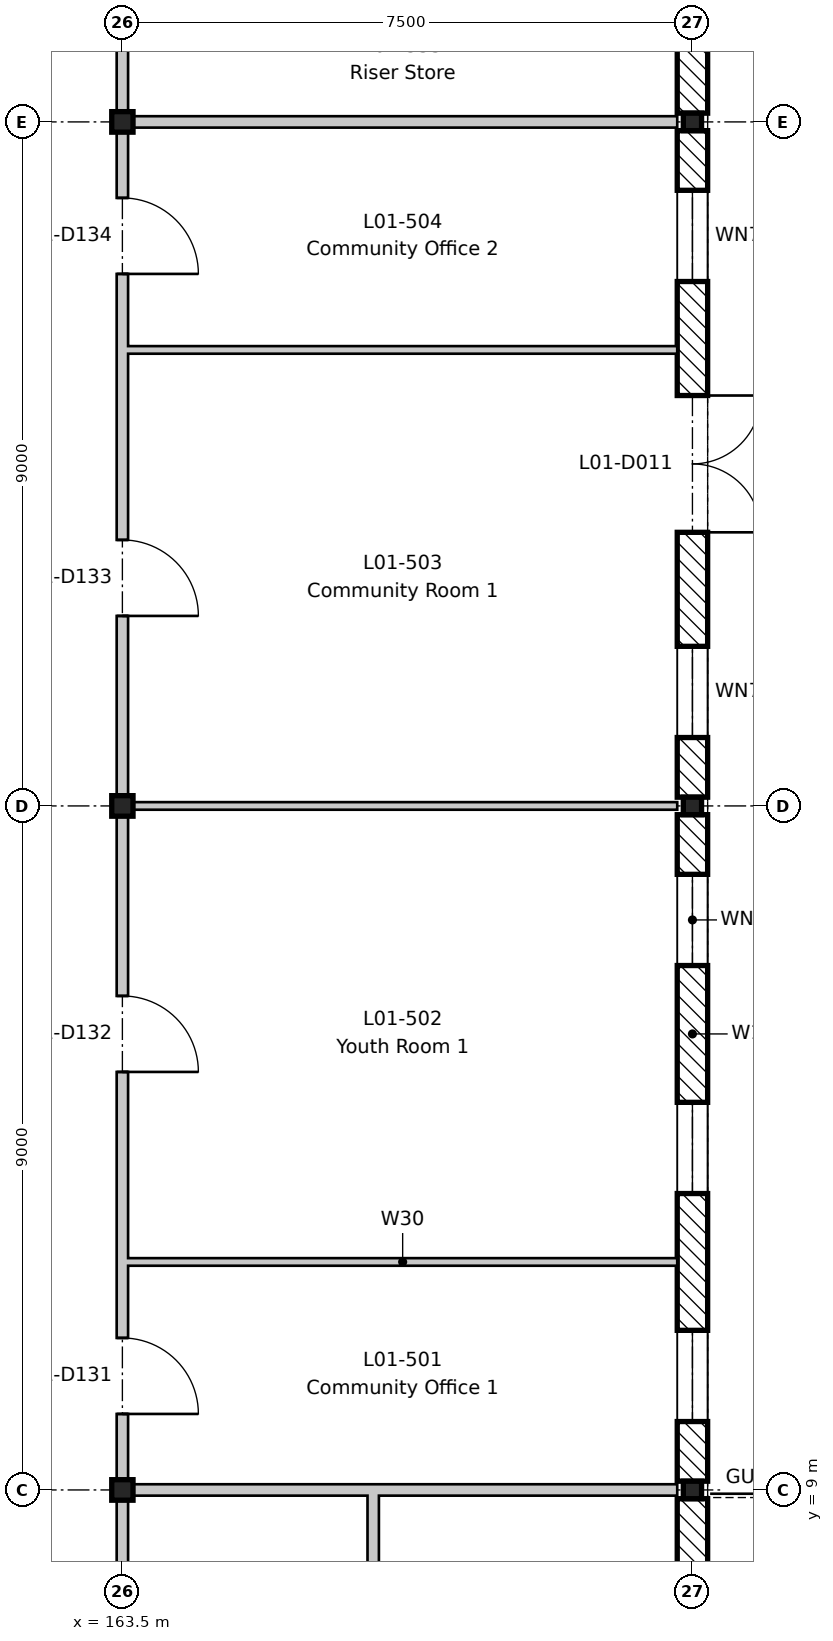
"""IFC4 building model, lengths in metres.
Left out: names, types, materials, properties, quantities, classifications, styles, units other than length and angle.
Written with IfcOpenShell. Run it as: python <this file> out.ifc"""

import sys

from ifc_helpers import new_model, si_unit, direction, frame, frame_2d, origin, origin_2d, place, context, subcontext, project, spatial, rectangle, i_section, extrude, element, fill, save


model = new_model("IFC4")
c1 = context("Model", 3, precision=1e-05, world=origin(), true_north=direction((0.0, 1.0)))
c2 = subcontext(c1, "Body", "Model", "MODEL_VIEW")
j1 = project(units=[si_unit("LENGTHUNIT", "METRE"), si_unit("PLANEANGLEUNIT", "RADIAN")], contexts=[c1])
p1 = place(None, origin())
s1 = spatial("IfcSite", under=j1, at=p1, CompositionType="ELEMENT")
p2 = place(p1, origin())
s2 = spatial("IfcBuilding", under=s1, at=p2, CompositionType="ELEMENT")
p3 = place(p2, frame((0.0, 0.0, 5.4)))
s3 = spatial("IfcBuildingStorey", under=s2, at=p3, CompositionType="ELEMENT", Elevation=5.4)
for number, where, z_axis, x_axis in (
    (1, (163.5, 9.0, -0.2), (0.0, 0.0, 1.0), (1.0, 0.0, 0.0)),
    (2, (163.5, 18.0, -0.2), (0.0, 0.0, 1.0), (1.0, 0.0, 0.0)),
    (3, (163.5, 27.0, -0.2), (0.0, 0.0, 1.0), (1.0, 0.0, 0.0)),
):
    element("IfcColumn", number, at=place(p3, frame(where, z_axis=z_axis, x_axis=x_axis)), inside=s3, PredefinedType="COLUMN", context=c2, shape_type="SweptSolid", body=[
        extrude(i_section(OverallWidth=0.28, OverallDepth=0.27, WebThickness=0.008, FlangeThickness=0.013, FilletRadius=0.024, at=origin_2d()), origin(), (0.0, 0.0, 1.0), 4.5),
    ])
for number, where, z_axis, x_axis in (
    (4, (171.0, 9.0, -0.2), (0.0, 0.0, 1.0), (1.0, 0.0, 0.0)),
    (5, (171.0, 18.0, -0.2), (0.0, 0.0, 1.0), (1.0, 0.0, 0.0)),
    (6, (171.0, 27.0, -0.2), (0.0, 0.0, 1.0), (1.0, 0.0, 0.0)),
):
    element("IfcColumn", number, at=place(p3, frame(where, z_axis=z_axis, x_axis=x_axis)), inside=s3, PredefinedType="COLUMN", context=c2, shape_type="SweptSolid", body=[
        extrude(i_section(OverallWidth=0.24, OverallDepth=0.23, WebThickness=0.008, FlangeThickness=0.012, FilletRadius=0.021, at=origin_2d()), origin(), (0.0, 0.0, 1.0), 4.5),
    ])
p4 = place(p3, frame((171.0, 8.885, 0.0), z_axis=(0.0, 0.0, 1.0), x_axis=(0.0, -1.0, 0.0)))
e7 = element("IfcWall", 7, at=p4, inside=s3, PredefinedType="STANDARD", context=c2, shape_type="SweptSolid", body=[
    extrude(rectangle(XDim=8.77, YDim=0.4, at=frame_2d((4.385, 0.0))), origin(), (0.0, 0.0, 1.0), 3.9),
])
p5 = place(p4, frame((7.085, 0.0, 1.5)))
e8 = element("IfcOpeningElement", 8, at=p5, cuts=e7, PredefinedType="OPENING", context=c2, shape_type="SweptSolid", body=[
    extrude(rectangle(XDim=0.6, YDim=1.2, at=frame_2d((0.3, 0.6))), frame((0.0, 0.21, 0.0), z_axis=(0.0, -1.0, 0.0), x_axis=(1.0, 0.0, 0.0)), (0.0, 0.0, 1.0), 0.42),
])
p6 = place(p4, frame((4.085, 0.0, 1.5)))
e9 = element("IfcOpeningElement", 9, at=p6, cuts=e7, PredefinedType="OPENING", context=c2, shape_type="SweptSolid", body=[
    extrude(rectangle(XDim=0.6, YDim=1.2, at=frame_2d((0.3, 0.6))), frame((0.0, 0.21, 0.0), z_axis=(0.0, -1.0, 0.0), x_axis=(1.0, 0.0, 0.0)), (0.0, 0.0, 1.0), 0.42),
])
p7 = place(p4, frame((1.085, 0.0, 1.5)))
e10 = element("IfcOpeningElement", 10, at=p7, cuts=e7, PredefinedType="OPENING", context=c2, shape_type="SweptSolid", body=[
    extrude(rectangle(XDim=0.6, YDim=1.2, at=frame_2d((0.3, 0.6))), frame((0.0, 0.21, 0.0), z_axis=(0.0, -1.0, 0.0), x_axis=(1.0, 0.0, 0.0)), (0.0, 0.0, 1.0), 0.42),
])
p8 = place(p3, frame((171.0, 17.885, 0.0), z_axis=(0.0, 0.0, 1.0), x_axis=(0.0, -1.0, 0.0)))
e11 = element("IfcWall", 11, at=p8, inside=s3, PredefinedType="STANDARD", context=c2, shape_type="SweptSolid", body=[
    extrude(rectangle(XDim=8.77, YDim=0.4, at=frame_2d((4.385, 0.0))), origin(), (0.0, 0.0, 1.0), 3.9),
])
p9 = place(p8, frame((6.785, 0.0, 0.9)))
e12 = element("IfcOpeningElement", 12, at=p9, cuts=e11, PredefinedType="OPENING", context=c2, shape_type="SweptSolid", body=[
    extrude(rectangle(XDim=1.2, YDim=2.4, at=frame_2d((0.6, 1.2))), frame((0.0, 0.21, 0.0), z_axis=(0.0, -1.0, 0.0), x_axis=(1.0, 0.0, 0.0)), (0.0, 0.0, 1.0), 0.42),
])
p10 = place(p8, frame((3.785, 0.0, 0.9)))
e13 = element("IfcOpeningElement", 13, at=p10, cuts=e11, PredefinedType="OPENING", context=c2, shape_type="SweptSolid", body=[
    extrude(rectangle(XDim=1.2, YDim=2.4, at=frame_2d((0.6, 1.2))), frame((0.0, 0.21, 0.0), z_axis=(0.0, -1.0, 0.0), x_axis=(1.0, 0.0, 0.0)), (0.0, 0.0, 1.0), 0.42),
])
p11 = place(p8, frame((0.785, 0.0, 0.9)))
e14 = element("IfcOpeningElement", 14, at=p11, cuts=e11, PredefinedType="OPENING", context=c2, shape_type="SweptSolid", body=[
    extrude(rectangle(XDim=1.2, YDim=2.4, at=frame_2d((0.6, 1.2))), frame((0.0, 0.21, 0.0), z_axis=(0.0, -1.0, 0.0), x_axis=(1.0, 0.0, 0.0)), (0.0, 0.0, 1.0), 0.42),
])
p12 = place(p3, frame((171.0, 26.885, 0.0), z_axis=(0.0, 0.0, 1.0), x_axis=(0.0, -1.0, 0.0)))
e15 = element("IfcWall", 15, at=p12, inside=s3, PredefinedType="STANDARD", context=c2, shape_type="SweptSolid", body=[
    extrude(rectangle(XDim=8.77, YDim=0.4, at=frame_2d((4.385, 0.0))), origin(), (0.0, 0.0, 1.0), 3.9),
])
p13 = place(p12, frame((3.485, 0.0, 0.0)))
e16 = element("IfcOpeningElement", 16, at=p13, cuts=e15, PredefinedType="OPENING", context=c2, shape_type="SweptSolid", body=[
    extrude(rectangle(XDim=1.8, YDim=2.4, at=frame_2d((0.9, 1.2))), frame((0.0, 0.21, 0.0), z_axis=(0.0, -1.0, 0.0), x_axis=(1.0, 0.0, 0.0)), (0.0, 0.0, 1.0), 0.42),
])
p14 = place(p12, frame((6.785, 0.0, 0.9)))
e17 = element("IfcOpeningElement", 17, at=p14, cuts=e15, PredefinedType="OPENING", context=c2, shape_type="SweptSolid", body=[
    extrude(rectangle(XDim=1.2, YDim=2.4, at=frame_2d((0.6, 1.2))), frame((0.0, 0.21, 0.0), z_axis=(0.0, -1.0, 0.0), x_axis=(1.0, 0.0, 0.0)), (0.0, 0.0, 1.0), 0.42),
])
p15 = place(p12, frame((0.785, 0.0, 0.9)))
e18 = element("IfcOpeningElement", 18, at=p15, cuts=e15, PredefinedType="OPENING", context=c2, shape_type="SweptSolid", body=[
    extrude(rectangle(XDim=1.2, YDim=2.4, at=frame_2d((0.6, 1.2))), frame((0.0, 0.21, 0.0), z_axis=(0.0, -1.0, 0.0), x_axis=(1.0, 0.0, 0.0)), (0.0, 0.0, 1.0), 0.42),
])
p16 = place(p3, frame((171.0, 35.885, 0.0), z_axis=(0.0, 0.0, 1.0), x_axis=(0.0, -1.0, 0.0)))
e19 = element("IfcWall", 19, at=p16, inside=s3, PredefinedType="STANDARD", context=c2, shape_type="SweptSolid", body=[
    extrude(rectangle(XDim=8.77, YDim=0.4, at=frame_2d((4.385, 0.0))), origin(), (0.0, 0.0, 1.0), 3.9),
])
p17 = place(p16, frame((3.785, 0.0, 0.9)))
e20 = element("IfcOpeningElement", 20, at=p17, cuts=e19, PredefinedType="OPENING", context=c2, shape_type="SweptSolid", body=[
    extrude(rectangle(XDim=1.2, YDim=2.7, at=frame_2d((0.6, 1.35))), frame((0.0, 0.21, 0.0), z_axis=(0.0, -1.0, 0.0), x_axis=(1.0, 0.0, 0.0)), (0.0, 0.0, 1.0), 0.42),
])
p18 = place(p16, frame((0.785, 0.0, 0.9)))
e21 = element("IfcOpeningElement", 21, at=p18, cuts=e19, PredefinedType="OPENING", context=c2, shape_type="SweptSolid", body=[
    extrude(rectangle(XDim=1.2, YDim=2.4, at=frame_2d((0.6, 1.2))), frame((0.0, 0.21, 0.0), z_axis=(0.0, -1.0, 0.0), x_axis=(1.0, 0.0, 0.0)), (0.0, 0.0, 1.0), 0.42),
])
p19 = place(p3, frame((163.575, 9.0, 0.0), z_axis=(0.0, 0.0, 1.0), x_axis=(1.0, 0.0, 0.0)))
e22 = element("IfcWall", 22, at=p19, inside=s3, PredefinedType="PARTITIONING", context=c2, shape_type="SweptSolid", body=[
    extrude(rectangle(XDim=7.225, YDim=0.15, at=frame_2d((3.613, 0.0))), origin(), (0.0, 0.0, 1.0), 3.95),
])
p20 = place(p3, frame((163.575, 12.0, 0.0), z_axis=(0.0, 0.0, 1.0), x_axis=(1.0, 0.0, 0.0)))
e23 = element("IfcWall", 23, at=p20, inside=s3, PredefinedType="PARTITIONING", context=c2, shape_type="SweptSolid", body=[
    extrude(rectangle(XDim=7.225, YDim=0.1, at=frame_2d((3.613, 0.0))), origin(), (0.0, 0.0, 1.0), 4.3),
])
p21 = place(p3, frame((163.575, 18.0, 0.0), z_axis=(0.0, 0.0, 1.0), x_axis=(1.0, 0.0, 0.0)))
e24 = element("IfcWall", 24, at=p21, inside=s3, PredefinedType="PARTITIONING", context=c2, shape_type="SweptSolid", body=[
    extrude(rectangle(XDim=7.225, YDim=0.1, at=frame_2d((3.613, 0.0))), origin(), (0.0, 0.0, 1.0), 3.95),
])
p22 = place(p3, frame((163.575, 24.0, 0.0), z_axis=(0.0, 0.0, 1.0), x_axis=(1.0, 0.0, 0.0)))
e25 = element("IfcWall", 25, at=p22, inside=s3, PredefinedType="PARTITIONING", context=c2, shape_type="SweptSolid", body=[
    extrude(rectangle(XDim=7.225, YDim=0.1, at=frame_2d((3.613, 0.0))), origin(), (0.0, 0.0, 1.0), 4.3),
])
p23 = place(p3, frame((163.575, 27.0, 0.0), z_axis=(0.0, 0.0, 1.0), x_axis=(1.0, 0.0, 0.0)))
e26 = element("IfcWall", 26, at=p23, inside=s3, PredefinedType="PARTITIONING", context=c2, shape_type="SweptSolid", body=[
    extrude(rectangle(XDim=7.225, YDim=0.15, at=frame_2d((3.613, 0.0))), origin(), (0.0, 0.0, 1.0), 3.95),
])
p24 = place(p3, frame((163.5, -8.8, 0.0), z_axis=(0.0, 0.0, 1.0), x_axis=(0.0, 1.0, 0.0)))
e27 = element("IfcWall", 27, at=p24, inside=s3, PredefinedType="PARTITIONING", context=c2, shape_type="SweptSolid", body=[
    extrude(rectangle(XDim=62.6, YDim=0.15, at=frame_2d((31.3, 0.0))), origin(), (0.0, 0.0, 1.0), 3.78),
])
p25 = place(p24, frame((18.8, 0.0, 0.0)))
e28 = element("IfcOpeningElement", 28, at=p25, cuts=e27, PredefinedType="OPENING", context=c2, shape_type="SweptSolid", body=[
    extrude(rectangle(XDim=1.0, YDim=2.1, at=frame_2d((0.5, 1.05))), frame((0.0, 0.085, 0.0), z_axis=(0.0, -1.0, 0.0), x_axis=(1.0, 0.0, 0.0)), (0.0, 0.0, 1.0), 0.17),
])
p26 = place(p24, frame((23.3, 0.0, 0.0)))
e29 = element("IfcOpeningElement", 29, at=p26, cuts=e27, PredefinedType="OPENING", context=c2, shape_type="SweptSolid", body=[
    extrude(rectangle(XDim=1.0, YDim=2.1, at=frame_2d((0.5, 1.05))), frame((0.0, 0.085, 0.0), z_axis=(0.0, -1.0, 0.0), x_axis=(1.0, 0.0, 0.0)), (0.0, 0.0, 1.0), 0.17),
])
p27 = place(p24, frame((29.3, 0.0, 0.0)))
e30 = element("IfcOpeningElement", 30, at=p27, cuts=e27, PredefinedType="OPENING", context=c2, shape_type="SweptSolid", body=[
    extrude(rectangle(XDim=1.0, YDim=2.1, at=frame_2d((0.5, 1.05))), frame((0.0, 0.085, 0.0), z_axis=(0.0, -1.0, 0.0), x_axis=(1.0, 0.0, 0.0)), (0.0, 0.0, 1.0), 0.17),
])
p28 = place(p24, frame((33.8, 0.0, 0.0)))
e31 = element("IfcOpeningElement", 31, at=p28, cuts=e27, PredefinedType="OPENING", context=c2, shape_type="SweptSolid", body=[
    extrude(rectangle(XDim=1.0, YDim=2.1, at=frame_2d((0.5, 1.05))), frame((0.0, 0.085, 0.0), z_axis=(0.0, -1.0, 0.0), x_axis=(1.0, 0.0, 0.0)), (0.0, 0.0, 1.0), 0.17),
])
p29 = place(p24, frame((45.8, 0.0, 0.0)))
e32 = element("IfcOpeningElement", 32, at=p29, cuts=e27, PredefinedType="OPENING", context=c2, shape_type="SweptSolid", body=[
    extrude(rectangle(XDim=1.0, YDim=2.1, at=frame_2d((0.5, 1.05))), frame((0.0, 0.085, 0.0), z_axis=(0.0, -1.0, 0.0), x_axis=(1.0, 0.0, 0.0)), (0.0, 0.0, 1.0), 0.17),
])
p30 = place(p24, frame((48.8, 0.0, 0.0)))
e33 = element("IfcOpeningElement", 33, at=p30, cuts=e27, PredefinedType="OPENING", context=c2, shape_type="SweptSolid", body=[
    extrude(rectangle(XDim=1.0, YDim=2.1, at=frame_2d((0.5, 1.05))), frame((0.0, 0.085, 0.0), z_axis=(0.0, -1.0, 0.0), x_axis=(1.0, 0.0, 0.0)), (0.0, 0.0, 1.0), 0.17),
])
p31 = place(p24, frame((51.8, 0.0, 0.0)))
e34 = element("IfcOpeningElement", 34, at=p31, cuts=e27, PredefinedType="OPENING", context=c2, shape_type="SweptSolid", body=[
    extrude(rectangle(XDim=1.0, YDim=2.1, at=frame_2d((0.5, 1.05))), frame((0.0, 0.085, 0.0), z_axis=(0.0, -1.0, 0.0), x_axis=(1.0, 0.0, 0.0)), (0.0, 0.0, 1.0), 0.17),
])
p32 = place(p24, frame((12.6, 0.0, 0.0)))
e35 = element("IfcOpeningElement", 35, at=p32, cuts=e27, PredefinedType="OPENING", context=c2, shape_type="SweptSolid", body=[
    extrude(rectangle(XDim=1.4, YDim=2.1, at=frame_2d((0.7, 1.05))), frame((0.0, 0.085, 0.0), z_axis=(0.0, -1.0, 0.0), x_axis=(1.0, 0.0, 0.0)), (0.0, 0.0, 1.0), 0.17),
])
p33 = place(p24, frame((3.6, 0.0, 0.0)))
e36 = element("IfcOpeningElement", 36, at=p33, cuts=e27, PredefinedType="OPENING", context=c2, shape_type="SweptSolid", body=[
    extrude(rectangle(XDim=1.4, YDim=2.1, at=frame_2d((0.7, 1.05))), frame((0.0, 0.085, 0.0), z_axis=(0.0, -1.0, 0.0), x_axis=(1.0, 0.0, 0.0)), (0.0, 0.0, 1.0), 0.17),
])
p34 = place(p24, frame((57.6, 0.0, 0.0)))
e37 = element("IfcOpeningElement", 37, at=p34, cuts=e27, PredefinedType="OPENING", context=c2, shape_type="SweptSolid", body=[
    extrude(rectangle(XDim=1.4, YDim=2.1, at=frame_2d((0.7, 1.05))), frame((0.0, 0.085, 0.0), z_axis=(0.0, -1.0, 0.0), x_axis=(1.0, 0.0, 0.0)), (0.0, 0.0, 1.0), 0.17),
])
p35 = place(p24, frame((36.75, 0.0, 0.0)))
e38 = element("IfcOpeningElement", 38, at=p35, cuts=e27, PredefinedType="OPENING", context=c2, shape_type="SweptSolid", body=[
    extrude(rectangle(XDim=1.0, YDim=2.1, at=frame_2d((0.5, 1.05))), frame((0.0, 0.085, 0.0), z_axis=(0.0, -1.0, 0.0), x_axis=(1.0, 0.0, 0.0)), (0.0, 0.0, 1.0), 0.17),
])
p36 = place(p24, frame((42.65, 0.0, 0.0)))
e39 = element("IfcOpeningElement", 39, at=p36, cuts=e27, PredefinedType="OPENING", context=c2, shape_type="SweptSolid", body=[
    extrude(rectangle(XDim=1.4, YDim=2.1, at=frame_2d((0.7, 1.05))), frame((0.0, 0.085, 0.0), z_axis=(0.0, -1.0, 0.0), x_axis=(1.0, 0.0, 0.0)), (0.0, 0.0, 1.0), 0.17),
])
p37 = place(p3, frame((166.8, 0.075, 0.0), z_axis=(0.0, 0.0, 1.0), x_axis=(0.0, 1.0, 0.0)))
e40 = element("IfcWall", 40, at=p37, inside=s3, PredefinedType="PARTITIONING", context=c2, shape_type="SweptSolid", body=[
    extrude(rectangle(XDim=8.85, YDim=0.15, at=frame_2d((4.425, 0.0))), origin(), (0.0, 0.0, 1.0), 4.3),
])
p38 = place(p37, frame((0.975, 0.0, 0.0)))
e41 = element("IfcOpeningElement", 41, at=p38, cuts=e40, PredefinedType="OPENING", context=c2, shape_type="SweptSolid", body=[
    extrude(rectangle(XDim=0.9, YDim=2.1, at=frame_2d((0.45, 1.05))), frame((0.0, 0.085, 0.0), z_axis=(0.0, -1.0, 0.0), x_axis=(1.0, 0.0, 0.0)), (0.0, 0.0, 1.0), 0.17),
])
p39 = place(p37, frame((3.975, 0.0, 0.0)))
e42 = element("IfcOpeningElement", 42, at=p39, cuts=e40, PredefinedType="OPENING", context=c2, shape_type="SweptSolid", body=[
    extrude(rectangle(XDim=0.9, YDim=2.1, at=frame_2d((0.45, 1.05))), frame((0.0, 0.085, 0.0), z_axis=(0.0, -1.0, 0.0), x_axis=(1.0, 0.0, 0.0)), (0.0, 0.0, 1.0), 0.17),
])
p40 = place(p37, frame((6.925, 0.0, 0.0)))
e43 = element("IfcOpeningElement", 43, at=p40, cuts=e40, PredefinedType="OPENING", context=c2, shape_type="SweptSolid", body=[
    extrude(rectangle(XDim=1.0, YDim=2.1, at=frame_2d((0.5, 1.05))), frame((0.0, 0.085, 0.0), z_axis=(0.0, -1.0, 0.0), x_axis=(1.0, 0.0, 0.0)), (0.0, 0.0, 1.0), 0.17),
])
p41 = place(p9, origin())
e44 = element("IfcWindow", 44, at=p41, inside=s3, PartitioningType="SINGLE_PANEL", PredefinedType="WINDOW", context=c2, shape_type="SweptSolid", body=[
    extrude(rectangle(XDim=1.2, YDim=2.4, at=frame_2d((0.6, 1.2))), frame((0.0, -0.12, 0.0), z_axis=(0.0, -1.0, 0.0), x_axis=(1.0, 0.0, 0.0)), (0.0, 0.0, 1.0), 0.06),
])
fill(e12, e44)
p42 = place(p10, origin())
e45 = element("IfcWindow", 45, at=p42, inside=s3, PartitioningType="SINGLE_PANEL", PredefinedType="WINDOW", context=c2, shape_type="SweptSolid", body=[
    extrude(rectangle(XDim=1.2, YDim=2.4, at=frame_2d((0.6, 1.2))), frame((0.0, -0.12, 0.0), z_axis=(0.0, -1.0, 0.0), x_axis=(1.0, 0.0, 0.0)), (0.0, 0.0, 1.0), 0.06),
])
fill(e13, e45)
p43 = place(p11, origin())
e46 = element("IfcWindow", 46, at=p43, inside=s3, PartitioningType="SINGLE_PANEL", PredefinedType="WINDOW", context=c2, shape_type="SweptSolid", body=[
    extrude(rectangle(XDim=1.2, YDim=2.4, at=frame_2d((0.6, 1.2))), frame((0.0, -0.12, 0.0), z_axis=(0.0, -1.0, 0.0), x_axis=(1.0, 0.0, 0.0)), (0.0, 0.0, 1.0), 0.06),
])
fill(e14, e46)
p44 = place(p13, origin())
e47 = element("IfcDoor", 47, at=p44, inside=s3, OperationType="DOUBLE_DOOR_SINGLE_SWING", PredefinedType="DOOR", context=c2, shape_type="SweptSolid", body=[
    extrude(rectangle(XDim=1.8, YDim=2.4, at=frame_2d((0.9, 1.2))), frame((0.0, 0.025, 0.0), z_axis=(0.0, -1.0, 0.0), x_axis=(1.0, 0.0, 0.0)), (0.0, 0.0, 1.0), 0.05),
])
fill(e16, e47)
p45 = place(p14, origin())
e48 = element("IfcWindow", 48, at=p45, inside=s3, PartitioningType="SINGLE_PANEL", PredefinedType="WINDOW", context=c2, shape_type="SweptSolid", body=[
    extrude(rectangle(XDim=1.2, YDim=2.4, at=frame_2d((0.6, 1.2))), frame((0.0, -0.12, 0.0), z_axis=(0.0, -1.0, 0.0), x_axis=(1.0, 0.0, 0.0)), (0.0, 0.0, 1.0), 0.06),
])
fill(e17, e48)
p46 = place(p15, origin())
e49 = element("IfcWindow", 49, at=p46, inside=s3, PartitioningType="SINGLE_PANEL", PredefinedType="WINDOW", context=c2, shape_type="SweptSolid", body=[
    extrude(rectangle(XDim=1.2, YDim=2.4, at=frame_2d((0.6, 1.2))), frame((0.0, -0.12, 0.0), z_axis=(0.0, -1.0, 0.0), x_axis=(1.0, 0.0, 0.0)), (0.0, 0.0, 1.0), 0.06),
])
fill(e18, e49)
p47 = place(p25, frame((1.0, 0.0, 0.0), z_axis=(0.0, 0.0, 1.0), x_axis=(-1.0, 0.0, 0.0)))
e50 = element("IfcDoor", 50, at=p47, inside=s3, OperationType="SINGLE_SWING_RIGHT", PredefinedType="DOOR", context=c2, shape_type="SweptSolid", body=[
    extrude(rectangle(XDim=1.0, YDim=2.1, at=frame_2d((0.5, 1.05))), frame((0.0, 0.025, 0.0), z_axis=(0.0, -1.0, 0.0), x_axis=(1.0, 0.0, 0.0)), (0.0, 0.0, 1.0), 0.05),
])
fill(e28, e50)
p48 = place(p26, frame((1.0, 0.0, 0.0), z_axis=(0.0, 0.0, 1.0), x_axis=(-1.0, 0.0, 0.0)))
e51 = element("IfcDoor", 51, at=p48, inside=s3, OperationType="SINGLE_SWING_RIGHT", PredefinedType="DOOR", context=c2, shape_type="SweptSolid", body=[
    extrude(rectangle(XDim=1.0, YDim=2.1, at=frame_2d((0.5, 1.05))), frame((0.0, 0.025, 0.0), z_axis=(0.0, -1.0, 0.0), x_axis=(1.0, 0.0, 0.0)), (0.0, 0.0, 1.0), 0.05),
])
fill(e29, e51)
p49 = place(p27, frame((1.0, 0.0, 0.0), z_axis=(0.0, 0.0, 1.0), x_axis=(-1.0, 0.0, 0.0)))
e52 = element("IfcDoor", 52, at=p49, inside=s3, OperationType="SINGLE_SWING_RIGHT", PredefinedType="DOOR", context=c2, shape_type="SweptSolid", body=[
    extrude(rectangle(XDim=1.0, YDim=2.1, at=frame_2d((0.5, 1.05))), frame((0.0, 0.025, 0.0), z_axis=(0.0, -1.0, 0.0), x_axis=(1.0, 0.0, 0.0)), (0.0, 0.0, 1.0), 0.05),
])
fill(e30, e52)
p50 = place(p28, frame((1.0, 0.0, 0.0), z_axis=(0.0, 0.0, 1.0), x_axis=(-1.0, 0.0, 0.0)))
e53 = element("IfcDoor", 53, at=p50, inside=s3, OperationType="SINGLE_SWING_RIGHT", PredefinedType="DOOR", context=c2, shape_type="SweptSolid", body=[
    extrude(rectangle(XDim=1.0, YDim=2.1, at=frame_2d((0.5, 1.05))), frame((0.0, 0.025, 0.0), z_axis=(0.0, -1.0, 0.0), x_axis=(1.0, 0.0, 0.0)), (0.0, 0.0, 1.0), 0.05),
])
fill(e31, e53)
save(model, sys.argv[1])
